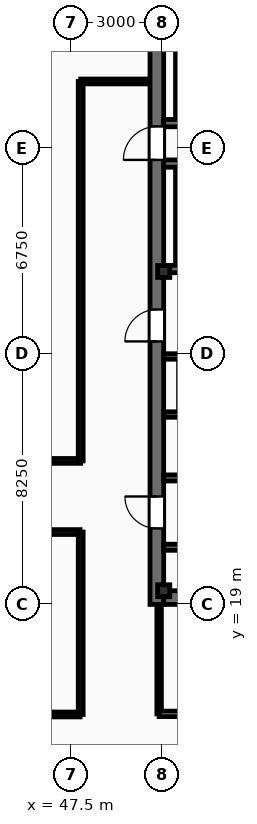
"""IFC4 building model, lengths in metres.
Left out: names, types, materials, properties, quantities, classifications, styles, units other than length and angle.
Written with IfcOpenShell. Run it as: python <this file> out.ifc"""

import sys

from ifc_helpers import new_model, si_unit, direction, frame, frame_2d, origin, origin_2d, place, context, subcontext, project, spatial, rectangle, i_section, extrude, element, fill, save


model = new_model("IFC4")
c1 = context("Model", 3, precision=1e-05, world=origin(), true_north=direction((0.0, 1.0)))
c2 = subcontext(c1, "Body", "Model", "MODEL_VIEW")
j1 = project(units=[si_unit("LENGTHUNIT", "METRE"), si_unit("PLANEANGLEUNIT", "RADIAN")], contexts=[c1])
p1 = place(None, origin())
s1 = spatial("IfcSite", under=j1, at=p1, CompositionType="ELEMENT")
p2 = place(p1, origin())
s2 = spatial("IfcBuilding", under=s1, at=p2, CompositionType="ELEMENT")
p3 = place(p2, frame((0.0, 0.0, 262.2)))
s3 = spatial("IfcBuildingStorey", under=s2, at=p3, CompositionType="ELEMENT", Elevation=262.2)
p4 = place(p3, frame((50.325, 19.0, -0.27), z_axis=(0.0, 0.0, 1.0), x_axis=(0.0, 1.0, 0.0)))
e1 = element("IfcWall", 1, at=p4, inside=s3, PredefinedType="SHEAR", context=c2, shape_type="SweptSolid", body=[
    extrude(rectangle(XDim=20.8, YDim=0.45, at=frame_2d((10.4, 0.0))), origin(), (0.0, 0.0, 1.0), 3.75),
])
p5 = place(p4, frame((2.5, 0.0, 0.27)))
e2 = element("IfcOpeningElement", 2, at=p5, cuts=e1, PredefinedType="OPENING", context=c2, shape_type="SweptSolid", body=[
    extrude(rectangle(XDim=1.05, YDim=2.15, at=frame_2d((0.525, 1.075))), frame((0.0, 0.235, 0.0), z_axis=(0.0, -1.0, 0.0), x_axis=(1.0, 0.0, 0.0)), (0.0, 0.0, 1.0), 0.47),
])
p6 = place(p4, frame((8.65, 0.0, 0.27)))
e3 = element("IfcOpeningElement", 3, at=p6, cuts=e1, PredefinedType="OPENING", context=c2, shape_type="SweptSolid", body=[
    extrude(rectangle(XDim=1.05, YDim=2.15, at=frame_2d((0.525, 1.075))), frame((0.0, 0.235, 0.0), z_axis=(0.0, -1.0, 0.0), x_axis=(1.0, 0.0, 0.0)), (0.0, 0.0, 1.0), 0.47),
])
p7 = place(p4, frame((14.62, 0.0, 0.27)))
e4 = element("IfcOpeningElement", 4, at=p7, cuts=e1, PredefinedType="OPENING", context=c2, shape_type="SweptSolid", body=[
    extrude(rectangle(XDim=1.1, YDim=2.15, at=frame_2d((0.55, 1.075))), frame((0.0, 0.235, 0.0), z_axis=(0.0, -1.0, 0.0), x_axis=(1.0, 0.0, 0.0)), (0.0, 0.0, 1.0), 0.47),
])
p8 = place(p3, frame((50.55, 19.225, -0.27), z_axis=(0.0, 0.0, 1.0), x_axis=(1.0, 0.0, 0.0)))
e5 = element("IfcWall", 5, at=p8, inside=s3, PredefinedType="SHEAR", context=c2, shape_type="SweptSolid", body=[
    extrude(rectangle(XDim=9.8, YDim=0.45, at=frame_2d((4.9, 0.0))), origin(), (0.0, 0.0, 1.0), 3.75),
])
for number, where, z_axis, x_axis in (
    (6, (50.55, 19.45, -0.27), (0.0, 0.0, 1.0), (1.0, 0.0, 0.0)),
    (7, (50.55, 29.95, -0.27), (0.0, 0.0, 1.0), (1.0, 0.0, 0.0)),
):
    element("IfcColumn", number, at=place(p3, frame(where, z_axis=z_axis, x_axis=x_axis)), inside=s3, PredefinedType="COLUMN", context=c2, shape_type="SweptSolid", body=[
        extrude(i_section(OverallWidth=0.399, OverallDepth=0.393, WebThickness=0.023, FlangeThickness=0.037, FilletRadius=0.02, at=origin_2d()), origin(), (0.0, 0.0, 1.0), 3.75),
    ])
p9 = place(p3, frame((60.35, 30.03, 0.0), z_axis=(0.0, 0.0, 1.0), x_axis=(-1.0, 0.0, 0.0)))
e8 = element("IfcWall", 8, at=p9, inside=s3, PredefinedType="SOLIDWALL", context=c2, shape_type="SweptSolid", body=[
    extrude(rectangle(XDim=9.8, YDim=0.24, at=frame_2d((4.9, 0.0))), origin(), (0.0, 0.0, 1.0), 3.48),
])
p10 = place(p9, frame((7.83, 0.0, 0.0)))
e9 = element("IfcOpeningElement", 9, at=p10, cuts=e8, PredefinedType="OPENING", context=c2, shape_type="SweptSolid", body=[
    extrude(rectangle(XDim=1.1, YDim=2.15, at=frame_2d((0.55, 1.075))), frame((0.0, 0.13, 0.0), z_axis=(0.0, -1.0, 0.0), x_axis=(1.0, 0.0, 0.0)), (0.0, 0.0, 1.0), 0.26),
])
p11 = place(p3, frame((50.55, 33.5, 0.0), z_axis=(0.0, 0.0, 1.0), x_axis=(1.0, 0.0, 0.0)))
e10 = element("IfcWall", 10, at=p11, inside=s3, PredefinedType="SOLIDWALL", context=c2, shape_type="SweptSolid", body=[
    extrude(rectangle(XDim=9.8, YDim=0.24, at=frame_2d((4.9, 0.0))), origin(), (0.0, 0.0, 1.0), 3.48),
])
p12 = place(p3, frame((51.06, 30.15, 0.0), z_axis=(0.0, 0.0, 1.0), x_axis=(0.0, 1.0, 0.0)))
e11 = element("IfcWall", 11, at=p12, inside=s3, PredefinedType="SOLIDWALL", context=c2, shape_type="SweptSolid", body=[
    extrude(rectangle(XDim=3.23, YDim=0.24, at=frame_2d((1.615, 0.0))), origin(), (0.0, 0.0, 1.0), 3.48),
])
p13 = place(p3, frame((60.35, 34.83, 0.0), z_axis=(0.0, 0.0, 1.0), x_axis=(-1.0, 0.0, 0.0)))
e12 = element("IfcWall", 12, at=p13, inside=s3, PredefinedType="SOLIDWALL", context=c2, shape_type="SweptSolid", body=[
    extrude(rectangle(XDim=9.8, YDim=0.24, at=frame_2d((4.9, 0.0))), origin(), (0.0, 0.0, 1.0), 3.48),
])
p14 = place(p13, frame((7.87, 0.0, 0.0)))
e13 = element("IfcOpeningElement", 13, at=p14, cuts=e12, PredefinedType="OPENING", context=c2, shape_type="SweptSolid", body=[
    extrude(rectangle(XDim=1.1, YDim=2.15, at=frame_2d((0.55, 1.075))), frame((0.0, 0.13, 0.0), z_axis=(0.0, -1.0, 0.0), x_axis=(1.0, 0.0, 0.0)), (0.0, 0.0, 1.0), 0.26),
])
p15 = place(p3, frame((51.06, 34.95, 0.0), z_axis=(0.0, 0.0, 1.0), x_axis=(0.0, 1.0, 0.0)))
e14 = element("IfcWall", 14, at=p15, inside=s3, PredefinedType="SOLIDWALL", context=c2, shape_type="SweptSolid", body=[
    extrude(rectangle(XDim=3.15, YDim=0.24, at=frame_2d((1.575, 0.0))), origin(), (0.0, 0.0, 1.0), 3.48),
])
p16 = place(p3, frame((50.55, 27.155, 0.0), z_axis=(0.0, 0.0, 1.0), x_axis=(1.0, 0.0, 0.0)))
e15 = element("IfcWall", 15, at=p16, inside=s3, PredefinedType="SOLIDWALL", context=c2, shape_type="SweptSolid", body=[
    extrude(rectangle(XDim=3.315, YDim=0.18, at=frame_2d((1.657, 0.0))), origin(), (0.0, 0.0, 1.0), 3.48),
])
p17 = place(p16, frame((1.235, 0.0, 0.0)))
e16 = element("IfcOpeningElement", 16, at=p17, cuts=e15, PredefinedType="OPENING", context=c2, shape_type="SweptSolid", body=[
    extrude(rectangle(XDim=1.35, YDim=2.3, at=frame_2d((0.675, 1.15))), frame((0.0, 0.1, 0.0), z_axis=(0.0, -1.0, 0.0), x_axis=(1.0, 0.0, 0.0)), (0.0, 0.0, 1.0), 0.2),
])
p18 = place(p3, frame((50.55, 25.245, 0.0), z_axis=(0.0, 0.0, 1.0), x_axis=(1.0, 0.0, 0.0)))
e17 = element("IfcWall", 17, at=p18, inside=s3, PredefinedType="SOLIDWALL", context=c2, shape_type="SweptSolid", body=[
    extrude(rectangle(XDim=3.315, YDim=0.18, at=frame_2d((1.657, 0.0))), origin(), (0.0, 0.0, 1.0), 3.48),
])
p19 = place(p3, frame((50.55, 20.88, 0.0), z_axis=(0.0, 0.0, 1.0), x_axis=(1.0, 0.0, 0.0)))
e18 = element("IfcWall", 18, at=p19, inside=s3, PredefinedType="SOLIDWALL", context=c2, shape_type="SweptSolid", body=[
    extrude(rectangle(XDim=9.8, YDim=0.2, at=frame_2d((4.9, 0.0))), origin(), (0.0, 0.0, 1.0), 2.54),
])
p20 = place(p19, frame((1.4, 0.0, 0.0)))
e19 = element("IfcOpeningElement", 19, at=p20, cuts=e18, PredefinedType="OPENING", context=c2, shape_type="SweptSolid", body=[
    extrude(rectangle(XDim=1.05, YDim=2.15, at=frame_2d((0.525, 1.075))), frame((0.0, 0.11, 0.0), z_axis=(0.0, -1.0, 0.0), x_axis=(1.0, 0.0, 0.0)), (0.0, 0.0, 1.0), 0.22),
])
p21 = place(p19, frame((5.5, 0.0, 0.0)))
e20 = element("IfcOpeningElement", 20, at=p21, cuts=e18, PredefinedType="OPENING", context=c2, shape_type="SweptSolid", body=[
    extrude(rectangle(XDim=1.05, YDim=2.15, at=frame_2d((0.525, 1.075))), frame((0.0, 0.11, 0.0), z_axis=(0.0, -1.0, 0.0), x_axis=(1.0, 0.0, 0.0)), (0.0, 0.0, 1.0), 0.22),
])
p22 = place(p3, frame((50.55, 23.16, 0.0), z_axis=(0.0, 0.0, 1.0), x_axis=(1.0, 0.0, 0.0)))
e21 = element("IfcWall", 21, at=p22, inside=s3, PredefinedType="SOLIDWALL", context=c2, shape_type="SweptSolid", body=[
    extrude(rectangle(XDim=3.33, YDim=0.2, at=frame_2d((1.665, 0.0))), origin(), (0.0, 0.0, 1.0), 2.54),
])
p23 = place(p22, frame((0.55, 0.0, 0.0)))
e22 = element("IfcOpeningElement", 22, at=p23, cuts=e21, PredefinedType="OPENING", context=c2, shape_type="SweptSolid", body=[
    extrude(rectangle(XDim=0.86, YDim=2.05, at=frame_2d((0.43, 1.025))), frame((0.0, 0.11, 0.0), z_axis=(0.0, -1.0, 0.0), x_axis=(1.0, 0.0, 0.0)), (0.0, 0.0, 1.0), 0.22),
])
p24 = place(p3, frame((50.4, 15.4, 0.0), z_axis=(0.0, 0.0, 1.0), x_axis=(1.0, 0.0, 0.0)))
e23 = element("IfcWall", 23, at=p24, inside=s3, PredefinedType="SOLIDWALL", context=c2, shape_type="SweptSolid", body=[
    extrude(rectangle(XDim=10.0, YDim=0.18, at=frame_2d((5.0, 0.0))), origin(), (0.0, 0.0, 1.0), 2.54),
])
p25 = place(p24, frame((1.94, 0.0, 0.0)))
e24 = element("IfcOpeningElement", 24, at=p25, cuts=e23, PredefinedType="OPENING", context=c2, shape_type="SweptSolid", body=[
    extrude(rectangle(XDim=0.92, YDim=2.1, at=frame_2d((0.46, 1.05))), frame((0.0, 0.1, 0.0), z_axis=(0.0, -1.0, 0.0), x_axis=(1.0, 0.0, 0.0)), (0.0, 0.0, 1.0), 0.2),
])
p26 = place(p24, frame((6.97, 0.0, 0.0)))
e25 = element("IfcOpeningElement", 25, at=p26, cuts=e23, PredefinedType="OPENING", context=c2, shape_type="SweptSolid", body=[
    extrude(rectangle(XDim=0.86, YDim=2.05, at=frame_2d((0.43, 1.025))), frame((0.0, 0.1, 0.0), z_axis=(0.0, -1.0, 0.0), x_axis=(1.0, 0.0, 0.0)), (0.0, 0.0, 1.0), 0.2),
])
p27 = place(p3, frame((50.4, 15.4, 0.0), z_axis=(0.0, 0.0, 1.0), x_axis=(0.0, 1.0, 0.0)))
e26 = element("IfcWall", 26, at=p27, inside=s3, PredefinedType="PARTITIONING", context=c2, shape_type="SweptSolid", body=[
    extrude(rectangle(XDim=3.58, YDim=0.15, at=frame_2d((1.79, 0.0))), origin(), (0.0, 0.0, 1.0), 2.54),
])
p28 = place(p3, frame((27.08, 23.72, 0.0), z_axis=(0.0, 0.0, 1.0), x_axis=(1.0, 0.0, 0.0)))
e27 = element("IfcWall", 27, at=p28, inside=s3, PredefinedType="PARTITIONING", context=c2, shape_type="SweptSolid", body=[
    extrude(rectangle(XDim=20.74, YDim=0.16, at=frame_2d((10.37, 0.0))), origin(), (0.0, 0.0, 1.0), 2.54),
])
p29 = place(p28, frame((1.595, 0.0, 0.0)))
e28 = element("IfcOpeningElement", 28, at=p29, cuts=e27, PredefinedType="OPENING", context=c2, shape_type="SweptSolid", body=[
    extrude(rectangle(XDim=0.95, YDim=2.15, at=frame_2d((0.475, 1.075))), frame((0.0, 0.09, 0.0), z_axis=(0.0, -1.0, 0.0), x_axis=(1.0, 0.0, 0.0)), (0.0, 0.0, 1.0), 0.18),
])
p30 = place(p28, frame((14.595, 0.0, 0.0)))
e29 = element("IfcOpeningElement", 29, at=p30, cuts=e27, PredefinedType="OPENING", context=c2, shape_type="SweptSolid", body=[
    extrude(rectangle(XDim=0.95, YDim=2.15, at=frame_2d((0.475, 1.075))), frame((0.0, 0.09, 0.0), z_axis=(0.0, -1.0, 0.0), x_axis=(1.0, 0.0, 0.0)), (0.0, 0.0, 1.0), 0.18),
])
p31 = place(p3, frame((41.84, 21.38, 0.0), z_axis=(0.0, 0.0, 1.0), x_axis=(1.0, 0.0, 0.0)))
e30 = element("IfcWall", 30, at=p31, inside=s3, PredefinedType="PARTITIONING", context=c2, shape_type="SweptSolid", body=[
    extrude(rectangle(XDim=5.96, YDim=0.16, at=frame_2d((2.98, 0.0))), origin(), (0.0, 0.0, 1.0), 2.54),
])
p32 = place(p31, frame((3.535, 0.0, 0.0)))
e31 = element("IfcOpeningElement", 31, at=p32, cuts=e30, PredefinedType="OPENING", context=c2, shape_type="SweptSolid", body=[
    extrude(rectangle(XDim=0.95, YDim=2.15, at=frame_2d((0.475, 1.075))), frame((0.0, 0.09, 0.0), z_axis=(0.0, -1.0, 0.0), x_axis=(1.0, 0.0, 0.0)), (0.0, 0.0, 1.0), 0.18),
])
p33 = place(p3, frame((41.84, 15.38, 0.0), z_axis=(0.0, 0.0, 1.0), x_axis=(1.0, 0.0, 0.0)))
e32 = element("IfcWall", 32, at=p33, inside=s3, PredefinedType="PARTITIONING", context=c2, shape_type="SweptSolid", body=[
    extrude(rectangle(XDim=5.96, YDim=0.16, at=frame_2d((2.98, 0.0))), origin(), (0.0, 0.0, 1.0), 2.54),
])
p34 = place(p3, frame((47.82, 15.38, 0.0), z_axis=(0.0, 0.0, 1.0), x_axis=(0.0, 1.0, 0.0)))
e33 = element("IfcWall", 33, at=p34, inside=s3, PredefinedType="PARTITIONING", context=c2, shape_type="SweptSolid", body=[
    extrude(rectangle(XDim=6.0, YDim=0.16, at=frame_2d((3.0, 0.0))), origin(), (0.0, 0.0, 1.0), 2.54),
])
p35 = place(p3, frame((47.82, 23.72, 0.0), z_axis=(0.0, 0.0, 1.0), x_axis=(0.0, 1.0, 0.0)))
e34 = element("IfcWall", 34, at=p35, inside=s3, PredefinedType="PARTITIONING", context=c2, shape_type="SweptSolid", body=[
    extrude(rectangle(XDim=12.48, YDim=0.16, at=frame_2d((6.24, 0.0))), origin(), (0.0, 0.0, 1.0), 2.54),
])
p36 = place(p3, frame((47.82, 36.2, 0.0), z_axis=(0.0, 0.0, 1.0), x_axis=(1.0, 0.0, 0.0)))
e35 = element("IfcWall", 35, at=p36, inside=s3, PredefinedType="PARTITIONING", context=c2, shape_type="SweptSolid", body=[
    extrude(rectangle(XDim=2.26, YDim=0.16, at=frame_2d((1.13, 0.0))), origin(), (0.0, 0.0, 1.0), 2.54),
])
p37 = place(p5, origin())
e36 = element("IfcDoor", 36, at=p37, inside=s3, OperationType="SINGLE_SWING_RIGHT", PredefinedType="DOOR", context=c2, shape_type="SweptSolid", body=[
    extrude(rectangle(XDim=1.05, YDim=2.15, at=frame_2d((0.525, 1.075))), frame((0.0, 0.025, 0.0), z_axis=(0.0, -1.0, 0.0), x_axis=(1.0, 0.0, 0.0)), (0.0, 0.0, 1.0), 0.05),
])
fill(e2, e36)
p38 = place(p6, origin())
e37 = element("IfcDoor", 37, at=p38, inside=s3, OperationType="SINGLE_SWING_LEFT", PredefinedType="DOOR", context=c2, shape_type="SweptSolid", body=[
    extrude(rectangle(XDim=1.05, YDim=2.15, at=frame_2d((0.525, 1.075))), frame((0.0, 0.025, 0.0), z_axis=(0.0, -1.0, 0.0), x_axis=(1.0, 0.0, 0.0)), (0.0, 0.0, 1.0), 0.05),
])
fill(e3, e37)
p39 = place(p7, origin())
e38 = element("IfcDoor", 38, at=p39, inside=s3, OperationType="SINGLE_SWING_LEFT", PredefinedType="DOOR", context=c2, shape_type="SweptSolid", body=[
    extrude(rectangle(XDim=1.1, YDim=2.15, at=frame_2d((0.55, 1.075))), frame((0.0, 0.025, 0.0), z_axis=(0.0, -1.0, 0.0), x_axis=(1.0, 0.0, 0.0)), (0.0, 0.0, 1.0), 0.05),
])
fill(e4, e38)
save(model, sys.argv[1])
